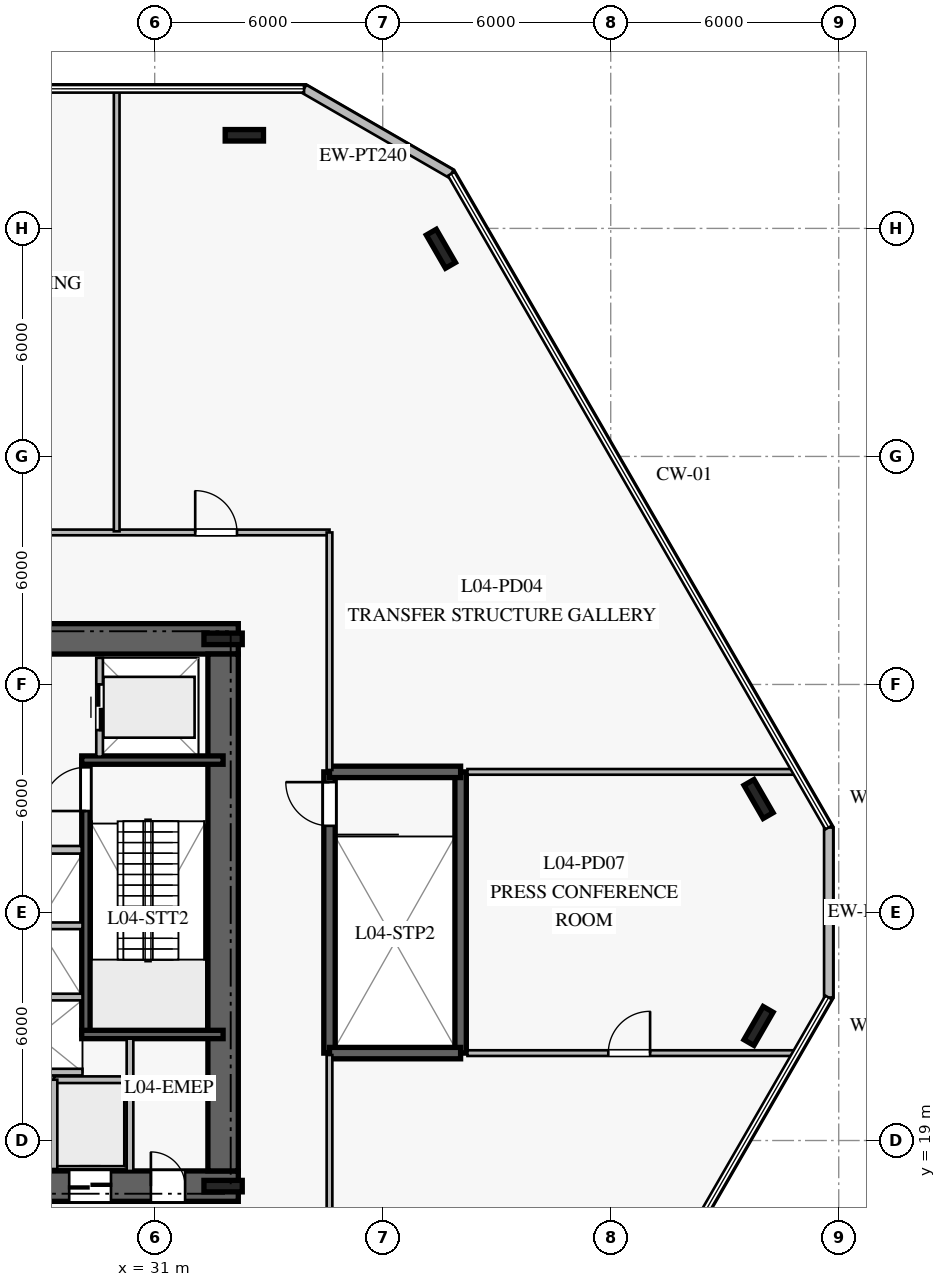
"""IFC4 building model, lengths in metres.
Left out: names, types, materials, properties, quantities, classifications, styles, units other than length and angle.
Written with IfcOpenShell. Run it as: python <this file> out.ifc"""

import sys

from ifc_helpers import new_model, si_unit, direction, frame, frame_2d, origin, origin_2d, place, context, subcontext, project, spatial, rectangle, i_section, extrude, element, fill, save


model = new_model("IFC4")
c1 = context("Model", 3, precision=1e-05, world=origin(), true_north=direction((0.0, 1.0)))
c2 = subcontext(c1, "Body", "Model", "MODEL_VIEW")
j1 = project(units=[si_unit("LENGTHUNIT", "METRE"), si_unit("PLANEANGLEUNIT", "RADIAN")], contexts=[c1])
p1 = place(None, origin())
s1 = spatial("IfcSite", under=j1, at=p1, CompositionType="ELEMENT")
p2 = place(p1, origin())
s2 = spatial("IfcBuilding", under=s1, at=p2, CompositionType="ELEMENT")
p3 = place(p2, frame((0.0, 0.0, 19.0)))
s3 = spatial("IfcBuildingStorey", under=s2, at=p3, CompositionType="ELEMENT", Elevation=19.0)
p4 = place(p3, frame((16.8, 17.8, 0.0), z_axis=(0.0, 0.0, 1.0), x_axis=(1.0, 0.0, 0.0)))
e1 = element("IfcWall", 1, at=p4, inside=s3, PredefinedType="SHEAR", context=c2, shape_type="SweptSolid", body=[
    extrude(rectangle(XDim=16.4, YDim=0.8, at=frame_2d((8.2, 0.0))), origin(), (0.0, 0.0, 1.0), 4.76),
])
p5 = place(p4, frame((5.15, 0.0, 0.0)))
e2 = element("IfcOpeningElement", 2, at=p5, cuts=e1, PredefinedType="OPENING", context=c2, shape_type="SweptSolid", body=[
    extrude(rectangle(XDim=1.2, YDim=2.25, at=frame_2d((0.6, 1.125))), frame((0.0, 0.41, 0.0), z_axis=(0.0, -1.0, 0.0), x_axis=(1.0, 0.0, 0.0)), (0.0, 0.0, 1.0), 0.82),
])
p6 = place(p4, frame((14.1, 0.0, 0.0)))
e3 = element("IfcOpeningElement", 3, at=p6, cuts=e1, PredefinedType="OPENING", context=c2, shape_type="SweptSolid", body=[
    extrude(rectangle(XDim=0.9, YDim=2.1, at=frame_2d((0.45, 1.05))), frame((0.0, 0.41, 0.0), z_axis=(0.0, -1.0, 0.0), x_axis=(1.0, 0.0, 0.0)), (0.0, 0.0, 1.0), 0.82),
])
p7 = place(p4, frame((8.0, 0.0, 0.0)))
e4 = element("IfcOpeningElement", 4, at=p7, cuts=e1, PredefinedType="OPENING", context=c2, shape_type="SweptSolid", body=[
    extrude(rectangle(XDim=1.1, YDim=2.2, at=frame_2d((0.55, 1.1))), frame((0.0, 0.41, 0.0), z_axis=(0.0, -1.0, 0.0), x_axis=(1.0, 0.0, 0.0)), (0.0, 0.0, 1.0), 0.82),
])
p8 = place(p4, frame((9.975, 0.0, 0.0)))
e5 = element("IfcOpeningElement", 5, at=p8, cuts=e1, PredefinedType="OPENING", context=c2, shape_type="SweptSolid", body=[
    extrude(rectangle(XDim=1.1, YDim=2.2, at=frame_2d((0.55, 1.1))), frame((0.0, 0.41, 0.0), z_axis=(0.0, -1.0, 0.0), x_axis=(1.0, 0.0, 0.0)), (0.0, 0.0, 1.0), 0.82),
])
p9 = place(p4, frame((11.95, 0.0, 0.0)))
e6 = element("IfcOpeningElement", 6, at=p9, cuts=e1, PredefinedType="OPENING", context=c2, shape_type="SweptSolid", body=[
    extrude(rectangle(XDim=1.1, YDim=2.2, at=frame_2d((0.55, 1.1))), frame((0.0, 0.41, 0.0), z_axis=(0.0, -1.0, 0.0), x_axis=(1.0, 0.0, 0.0)), (0.0, 0.0, 1.0), 0.82),
])
p10 = place(p3, frame((33.2, 32.2, 0.0), z_axis=(0.0, 0.0, 1.0), x_axis=(-1.0, 0.0, 0.0)))
e7 = element("IfcWall", 7, at=p10, inside=s3, PredefinedType="SHEAR", context=c2, shape_type="SweptSolid", body=[
    extrude(rectangle(XDim=16.4, YDim=0.8, at=frame_2d((8.2, 0.0))), origin(), (0.0, 0.0, 1.0), 4.76),
])
p11 = place(p10, frame((5.15, 0.0, 0.0)))
e8 = element("IfcOpeningElement", 8, at=p11, cuts=e7, PredefinedType="OPENING", context=c2, shape_type="SweptSolid", body=[
    extrude(rectangle(XDim=1.2, YDim=2.25, at=frame_2d((0.6, 1.125))), frame((0.0, 0.41, 0.0), z_axis=(0.0, -1.0, 0.0), x_axis=(1.0, 0.0, 0.0)), (0.0, 0.0, 1.0), 0.82),
])
p12 = place(p3, frame((32.8, 18.2, 0.0), z_axis=(0.0, 0.0, 1.0), x_axis=(0.0, 1.0, 0.0)))
e9 = element("IfcWall", 9, at=p12, inside=s3, PredefinedType="SHEAR", context=c2, shape_type="SweptSolid", body=[
    extrude(rectangle(XDim=13.6, YDim=0.8, at=frame_2d((6.8, 0.0))), origin(), (0.0, 0.0, 1.0), 4.76),
])
for number, where, z_axis, x_axis in (
    (10, (32.8, 17.8, 0.0), (0.0, 0.0, 1.0), (1.0, 0.0, 0.0)),
    (11, (32.8, 32.2, 0.0), (0.0, 0.0, 1.0), (1.0, 0.0, 0.0)),
):
    element("IfcColumn", number, at=place(p3, frame(where, z_axis=z_axis, x_axis=x_axis)), inside=s3, PredefinedType="COLUMN", context=c2, shape_type="SweptSolid", body=[
        extrude(i_section(OverallWidth=0.302, OverallDepth=1.008, WebThickness=0.021, FlangeThickness=0.04, at=origin_2d()), origin(), (0.0, 0.0, 1.0), 5.0),
    ])
p13 = place(p3, frame((29.19, 21.79, 0.0), z_axis=(0.0, 0.0, 1.0), x_axis=(0.0, 1.0, 0.0)))
e12 = element("IfcWall", 12, at=p13, inside=s3, PredefinedType="SOLIDWALL", context=c2, shape_type="SweptSolid", body=[
    extrude(rectangle(XDim=7.22, YDim=0.22, at=frame_2d((3.61, 0.0))), origin(), (0.0, 0.0, 1.0), 4.76),
])
p14 = place(p13, frame((5.88, 0.0, 0.0)))
e13 = element("IfcOpeningElement", 13, at=p14, cuts=e12, PredefinedType="OPENING", context=c2, shape_type="SweptSolid", body=[
    extrude(rectangle(XDim=1.15, YDim=2.2, at=frame_2d((0.575, 1.1))), frame((0.0, 0.12, 0.0), z_axis=(0.0, -1.0, 0.0), x_axis=(1.0, 0.0, 0.0)), (0.0, 0.0, 1.0), 0.24),
])
for number, where, z_axis, x_axis in (
    (14, (29.08, 21.79, 0.0), (0.0, 0.0, 1.0), (1.0, 0.0, 0.0)),
    (15, (29.08, 29.01, 0.0), (0.0, 0.0, 1.0), (1.0, 0.0, 0.0)),
):
    element("IfcWall", number, at=place(p3, frame(where, z_axis=z_axis, x_axis=x_axis)), inside=s3, PredefinedType="SOLIDWALL", context=c2, shape_type="SweptSolid", body=[
        extrude(rectangle(XDim=3.72, YDim=0.22, at=frame_2d((1.86, 0.0))), origin(), (0.0, 0.0, 1.0), 4.76),
    ])
p15 = place(p3, frame((35.6, 21.3, 0.0), z_axis=(0.0, 0.0, 1.0), x_axis=(0.0, 1.0, 0.0)))
e16 = element("IfcWall", 16, at=p15, inside=s3, PredefinedType="SOLIDWALL", context=c2, shape_type="SweptSolid", body=[
    extrude(rectangle(XDim=7.4, YDim=0.3, at=frame_2d((3.7, 0.0))), origin(), (0.0, 0.0, 1.0), 4.76),
])
p16 = place(p15, frame((5.98, 0.0, 0.0)))
e17 = element("IfcOpeningElement", 17, at=p16, cuts=e16, PredefinedType="OPENING", context=c2, shape_type="SweptSolid", body=[
    extrude(rectangle(XDim=1.15, YDim=2.2, at=frame_2d((0.575, 1.1))), frame((0.0, 0.16, 0.0), z_axis=(0.0, -1.0, 0.0), x_axis=(1.0, 0.0, 0.0)), (0.0, 0.0, 1.0), 0.32),
])
p17 = place(p3, frame((39.05, 21.3, 0.0), z_axis=(0.0, 0.0, 1.0), x_axis=(0.0, 1.0, 0.0)))
e18 = element("IfcWall", 18, at=p17, inside=s3, PredefinedType="SOLIDWALL", context=c2, shape_type="SweptSolid", body=[
    extrude(rectangle(XDim=7.4, YDim=0.3, at=frame_2d((3.7, 0.0))), origin(), (0.0, 0.0, 1.0), 4.76),
])
for number, where, z_axis, x_axis in (
    (19, (35.6, 21.3, 0.0), (0.0, 0.0, 1.0), (1.0, 0.0, 0.0)),
    (20, (35.6, 28.7, 0.0), (0.0, 0.0, 1.0), (1.0, 0.0, 0.0)),
):
    element("IfcWall", number, at=place(p3, frame(where, z_axis=z_axis, x_axis=x_axis)), inside=s3, PredefinedType="SOLIDWALL", context=c2, shape_type="SweptSolid", body=[
        extrude(rectangle(XDim=3.45, YDim=0.3, at=frame_2d((1.725, 0.0))), origin(), (0.0, 0.0, 1.0), 4.76),
    ])
for number, where, z_axis, x_axis in (
    (21, (46.89, 27.986, 0.0), (0.0, 0.0, 1.0), (-0.5, 0.866, 0.0)),
    (22, (38.531, 42.464, 0.0), (0.0, 0.0, 1.0), (-0.5, 0.866, 0.0)),
    (23, (33.359, 45.45, 0.0), (0.0, 0.0, 1.0), (1.0, 0.0, 0.0)),
    (24, (46.89, 22.014, 0.0), (0.0, 0.0, 1.0), (0.5, 0.866, 0.0)),
):
    element("IfcColumn", number, at=place(p3, frame(where, z_axis=z_axis, x_axis=x_axis)), inside=s3, PredefinedType="COLUMN", context=c2, shape_type="SweptSolid", body=[
        extrude(i_section(OverallWidth=0.302, OverallDepth=1.008, WebThickness=0.021, FlangeThickness=0.04, at=origin_2d()), origin(), (0.0, 0.0, 1.0), 5.0),
    ])
p18 = place(p3, frame((38.804, 44.436, 0.0), z_axis=(0.0, 0.0, 1.0), x_axis=(-0.865987450899, 0.500065730564, 0.0)))
e25 = element("IfcWall", 25, at=p18, inside=s3, PredefinedType="STANDARD", context=c2, shape_type="SweptSolid", body=[
    extrude(rectangle(XDim=4.474, YDim=0.24, at=frame_2d((2.237, 0.0))), origin(), (0.0, 0.0, 1.0), 4.76),
])
p19 = place(p3, frame((48.734, 22.763, 0.0), z_axis=(0.0, 0.0, 1.0), x_axis=(0.0, 1.0, 0.0)))
e26 = element("IfcWall", 26, at=p19, inside=s3, PredefinedType="STANDARD", context=c2, shape_type="SweptSolid", body=[
    extrude(rectangle(XDim=4.474, YDim=0.24, at=frame_2d((2.237, 0.0))), origin(), (0.0, 0.0, 1.0), 4.76),
])
p20 = place(p3, frame((25.7, 26.65, 0.0), z_axis=(0.0, 0.0, 1.0), x_axis=(1.0, 0.0, 0.0)))
e27 = element("IfcWall", 27, at=p20, inside=s3, PredefinedType="PARTITIONING", context=c2, shape_type="SweptSolid", body=[
    extrude(rectangle(XDim=3.38, YDim=0.2, at=frame_2d((1.69, 0.0))), origin(), (0.0, 0.0, 1.0), 4.76),
])
p21 = place(p3, frame((30.35, 18.2, 0.0), z_axis=(0.0, 0.0, 1.0), x_axis=(0.0, 1.0, 0.0)))
e28 = element("IfcWall", 28, at=p21, inside=s3, PredefinedType="PARTITIONING", context=c2, shape_type="SweptSolid", body=[
    extrude(rectangle(XDim=3.48, YDim=0.175, at=frame_2d((1.74, 0.0))), origin(), (0.0, 0.0, 1.0), 4.76),
])
p22 = place(p3, frame((28.35, 20.6, 0.0), z_axis=(0.0, 0.0, 1.0), x_axis=(1.0, 0.0, 0.0)))
e29 = element("IfcWall", 29, at=p22, inside=s3, PredefinedType="PARTITIONING", context=c2, shape_type="SweptSolid", body=[
    extrude(rectangle(XDim=1.9, YDim=0.175, at=frame_2d((0.95, 0.0))), origin(), (0.0, 0.0, 1.0), 4.76),
])
for number, where, z_axis, x_axis in (
    (30, (28.35, 18.25, 0.0), (0.0, 0.0, 1.0), (0.0, 1.0, 0.0)),
    (31, (26.75, 20.8, 0.0), (0.0, 0.0, 1.0), (1.0, 0.0, 0.0)),
    (32, (26.75, 22.775, 0.0), (0.0, 0.0, 1.0), (1.0, 0.0, 0.0)),
    (33, (26.75, 24.65, 0.0), (0.0, 0.0, 1.0), (1.0, 0.0, 0.0)),
):
    element("IfcWall", number, at=place(p3, frame(where, z_axis=z_axis, x_axis=x_axis)), inside=s3, PredefinedType="PARTITIONING", context=c2, shape_type="SweptSolid", body=[
        extrude(rectangle(XDim=2.35, YDim=0.175, at=frame_2d((1.175, 0.0))), origin(), (0.0, 0.0, 1.0), 4.76),
    ])
p23 = place(p3, frame((29.55, 29.1, 0.0), z_axis=(0.0, 0.0, 1.0), x_axis=(0.0, 1.0, 0.0)))
e34 = element("IfcWall", 34, at=p23, inside=s3, PredefinedType="PARTITIONING", context=c2, shape_type="SweptSolid", body=[
    extrude(rectangle(XDim=2.6, YDim=0.175, at=frame_2d((1.3, 0.0))), origin(), (0.0, 0.0, 1.0), 4.76),
])
p24 = place(p23, frame((0.7, 0.0, 0.0)))
e35 = element("IfcOpeningElement", 35, at=p24, cuts=e34, PredefinedType="OPENING", context=c2, shape_type="SweptSolid", body=[
    extrude(rectangle(XDim=1.2, YDim=2.2, at=frame_2d((0.6, 1.1))), frame((0.0, 0.098, 0.0), z_axis=(0.0, -1.0, 0.0), x_axis=(1.0, 0.0, 0.0)), (0.0, 0.0, 1.0), 0.195),
])
p25 = place(p3, frame((14.4, 35.0, 0.0), z_axis=(0.0, 0.0, 1.0), x_axis=(1.0, 0.0, 0.0)))
e36 = element("IfcWall", 36, at=p25, inside=s3, PredefinedType="PARTITIONING", context=c2, shape_type="SweptSolid", body=[
    extrude(rectangle(XDim=21.2, YDim=0.15, at=frame_2d((10.6, 0.0))), origin(), (0.0, 0.0, 1.0), 2.76),
])
p26 = place(p25, frame((2.12, 0.0, 0.0)))
e37 = element("IfcOpeningElement", 37, at=p26, cuts=e36, PredefinedType="OPENING", context=c2, shape_type="SweptSolid", body=[
    extrude(rectangle(XDim=0.95, YDim=2.1, at=frame_2d((0.475, 1.05))), frame((0.0, 0.085, 0.0), z_axis=(0.0, -1.0, 0.0), x_axis=(1.0, 0.0, 0.0)), (0.0, 0.0, 1.0), 0.17),
])
p27 = place(p25, frame((6.75, 0.0, 0.0)))
e38 = element("IfcOpeningElement", 38, at=p27, cuts=e36, PredefinedType="OPENING", context=c2, shape_type="SweptSolid", body=[
    extrude(rectangle(XDim=1.1, YDim=2.2, at=frame_2d((0.55, 1.1))), frame((0.0, 0.085, 0.0), z_axis=(0.0, -1.0, 0.0), x_axis=(1.0, 0.0, 0.0)), (0.0, 0.0, 1.0), 0.17),
])
p28 = place(p25, frame((17.666, 0.0, 0.0)))
e39 = element("IfcOpeningElement", 39, at=p28, cuts=e36, PredefinedType="OPENING", context=c2, shape_type="SweptSolid", body=[
    extrude(rectangle(XDim=1.1, YDim=2.2, at=frame_2d((0.55, 1.1))), frame((0.0, 0.085, 0.0), z_axis=(0.0, -1.0, 0.0), x_axis=(1.0, 0.0, 0.0)), (0.0, 0.0, 1.0), 0.17),
])
p29 = place(p25, frame((12.05, 0.0, 0.0)))
e40 = element("IfcOpeningElement", 40, at=p29, cuts=e36, PredefinedType="OPENING", context=c2, shape_type="SweptSolid", body=[
    extrude(rectangle(XDim=1.1, YDim=2.2, at=frame_2d((0.55, 1.1))), frame((0.0, 0.085, 0.0), z_axis=(0.0, -1.0, 0.0), x_axis=(1.0, 0.0, 0.0)), (0.0, 0.0, 1.0), 0.17),
])
for number, where, z_axis, x_axis in (
    (41, (35.6, 15.0, 0.0), (0.0, 0.0, 1.0), (0.0, 1.0, 0.0)),
    (42, (35.6, 28.75, 0.0), (0.0, 0.0, 1.0), (0.0, 1.0, 0.0)),
):
    element("IfcWall", number, at=place(p3, frame(where, z_axis=z_axis, x_axis=x_axis)), inside=s3, PredefinedType="PARTITIONING", context=c2, shape_type="SweptSolid", body=[
        extrude(rectangle(XDim=6.25, YDim=0.15, at=frame_2d((3.125, 0.0))), origin(), (0.0, 0.0, 1.0), 2.76),
    ])
p30 = place(p3, frame((39.23, 21.3, 0.0), z_axis=(0.0, 0.0, 1.0), x_axis=(1.0, 0.0, 0.0)))
e43 = element("IfcWall", 43, at=p30, inside=s3, PredefinedType="PARTITIONING", context=c2, shape_type="SweptSolid", body=[
    extrude(rectangle(XDim=8.69, YDim=0.15, at=frame_2d((4.345, 0.0))), origin(), (0.0, 0.0, 1.0), 2.76),
])
p31 = place(p30, frame((3.706, 0.0, 0.0)))
e44 = element("IfcOpeningElement", 44, at=p31, cuts=e43, PredefinedType="OPENING", context=c2, shape_type="SweptSolid", body=[
    extrude(rectangle(XDim=1.1, YDim=2.2, at=frame_2d((0.55, 1.1))), frame((0.0, 0.085, 0.0), z_axis=(0.0, -1.0, 0.0), x_axis=(1.0, 0.0, 0.0)), (0.0, 0.0, 1.0), 0.17),
])
p32 = place(p3, frame((39.23, 28.7, 0.0), z_axis=(0.0, 0.0, 1.0), x_axis=(1.0, 0.0, 0.0)))
e45 = element("IfcWall", 45, at=p32, inside=s3, PredefinedType="PARTITIONING", context=c2, shape_type="SweptSolid", body=[
    extrude(rectangle(XDim=8.69, YDim=0.15, at=frame_2d((4.345, 0.0))), origin(), (0.0, 0.0, 1.0), 2.76),
])
p33 = place(p3, frame((30.0, 35.03, 0.0), z_axis=(0.0, 0.0, 1.0), x_axis=(0.0, 1.0, 0.0)))
e46 = element("IfcWall", 46, at=p33, inside=s3, PredefinedType="PARTITIONING", context=c2, shape_type="SweptSolid", body=[
    extrude(rectangle(XDim=11.67, YDim=0.15, at=frame_2d((5.835, 0.0))), origin(), (0.0, 0.0, 1.0), 2.76),
])
p34 = place(p14, origin())
e47 = element("IfcDoor", 47, at=p34, inside=s3, OperationType="SINGLE_SWING_LEFT", PredefinedType="DOOR", context=c2, shape_type="SweptSolid", body=[
    extrude(rectangle(XDim=1.15, YDim=2.2, at=frame_2d((0.575, 1.1))), frame((0.0, 0.025, 0.0), z_axis=(0.0, -1.0, 0.0), x_axis=(1.0, 0.0, 0.0)), (0.0, 0.0, 1.0), 0.05),
])
fill(e13, e47)
p35 = place(p6, origin())
e48 = element("IfcDoor", 48, at=p35, inside=s3, OperationType="SINGLE_SWING_LEFT", PredefinedType="DOOR", context=c2, shape_type="SweptSolid", body=[
    extrude(rectangle(XDim=0.9, YDim=2.1, at=frame_2d((0.45, 1.05))), frame((0.0, 0.025, 0.0), z_axis=(0.0, -1.0, 0.0), x_axis=(1.0, 0.0, 0.0)), (0.0, 0.0, 1.0), 0.05),
])
fill(e3, e48)
p36 = place(p9, origin())
e49 = element("IfcDoor", 49, at=p36, inside=s3, OperationType="DOUBLE_DOOR_SLIDING", PredefinedType="DOOR", context=c2, shape_type="SweptSolid", body=[
    extrude(rectangle(XDim=1.1, YDim=2.2, at=frame_2d((0.55, 1.1))), frame((0.0, 0.025, 0.0), z_axis=(0.0, -1.0, 0.0), x_axis=(1.0, 0.0, 0.0)), (0.0, 0.0, 1.0), 0.05),
])
fill(e6, e49)
p37 = place(p24, origin())
e50 = element("IfcDoor", 50, at=p37, inside=s3, OperationType="DOUBLE_DOOR_SLIDING", PredefinedType="DOOR", context=c2, shape_type="SweptSolid", body=[
    extrude(rectangle(XDim=1.2, YDim=2.2, at=frame_2d((0.6, 1.1))), frame((0.0, 0.025, 0.0), z_axis=(0.0, -1.0, 0.0), x_axis=(1.0, 0.0, 0.0)), (0.0, 0.0, 1.0), 0.05),
])
fill(e35, e50)
p38 = place(p16, origin())
e51 = element("IfcDoor", 51, at=p38, inside=s3, OperationType="SINGLE_SWING_RIGHT", PredefinedType="DOOR", context=c2, shape_type="SweptSolid", body=[
    extrude(rectangle(XDim=1.15, YDim=2.2, at=frame_2d((0.575, 1.1))), frame((0.0, 0.025, 0.0), z_axis=(0.0, -1.0, 0.0), x_axis=(1.0, 0.0, 0.0)), (0.0, 0.0, 1.0), 0.05),
])
fill(e17, e51)
p39 = place(p28, origin())
e52 = element("IfcDoor", 52, at=p39, inside=s3, OperationType="SINGLE_SWING_LEFT", PredefinedType="DOOR", context=c2, shape_type="SweptSolid", body=[
    extrude(rectangle(XDim=1.1, YDim=2.2, at=frame_2d((0.55, 1.1))), frame((0.0, 0.025, 0.0), z_axis=(0.0, -1.0, 0.0), x_axis=(1.0, 0.0, 0.0)), (0.0, 0.0, 1.0), 0.05),
])
fill(e39, e52)
p40 = place(p31, origin())
e53 = element("IfcDoor", 53, at=p40, inside=s3, OperationType="SINGLE_SWING_RIGHT", PredefinedType="DOOR", context=c2, shape_type="SweptSolid", body=[
    extrude(rectangle(XDim=1.1, YDim=2.2, at=frame_2d((0.55, 1.1))), frame((0.0, 0.025, 0.0), z_axis=(0.0, -1.0, 0.0), x_axis=(1.0, 0.0, 0.0)), (0.0, 0.0, 1.0), 0.05),
])
fill(e44, e53)
save(model, sys.argv[1])
